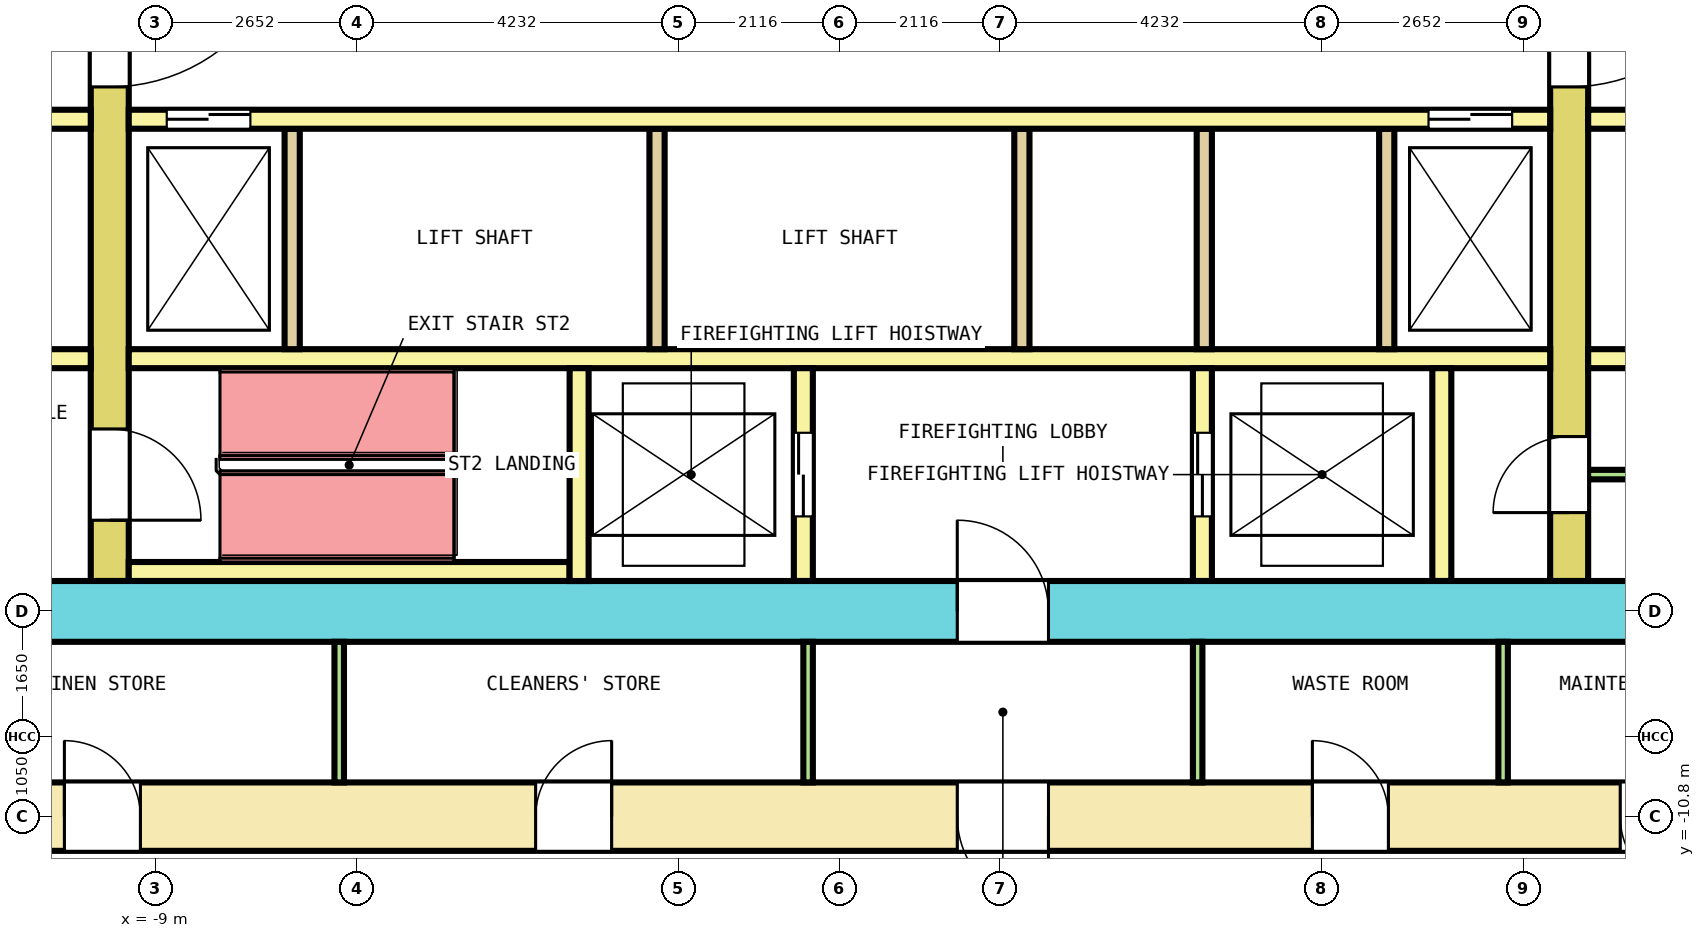
"""IFC4 building model, lengths in metres.
Left out: names, types, materials, properties, quantities, classifications, styles, units other than length and angle.
Written with IfcOpenShell. Run it as: python <this file> out.ifc"""

import sys

from ifc_helpers import new_model, si_unit, direction, frame, frame_2d, origin, place, context, subcontext, project, spatial, rectangle, extrude, element, fill, save


model = new_model("IFC4")
c1 = context("Model", 3, precision=1e-05, world=origin(), true_north=direction((0.0, 1.0)))
c2 = subcontext(c1, "Body", "Model", "MODEL_VIEW")
j1 = project(units=[si_unit("LENGTHUNIT", "METRE"), si_unit("PLANEANGLEUNIT", "RADIAN")], contexts=[c1])
p1 = place(None, origin())
s1 = spatial("IfcSite", under=j1, at=p1, CompositionType="ELEMENT")
p2 = place(p1, origin())
s2 = spatial("IfcBuilding", under=s1, at=p2, CompositionType="ELEMENT")
p3 = place(p2, frame((0.0, 0.0, 36.6)))
s3 = spatial("IfcBuildingStorey", under=s2, at=p3, CompositionType="ELEMENT", Elevation=36.6)
p4 = place(p3, frame((-13.65, -10.8, 0.0), z_axis=(0.0, 0.0, 1.0), x_axis=(1.0, 0.0, 0.0)))
e1 = element("IfcWall", 1, at=p4, inside=s3, PredefinedType="SHEAR", context=c2, shape_type="SweptSolid", body=[
    extrude(rectangle(XDim=27.3, YDim=0.9, at=frame_2d((13.65, 0.0))), origin(), (0.0, 0.0, 1.0), 4.1),
])
p5 = place(p4, frame((3.453, 0.0, 0.0)))
e2 = element("IfcOpeningElement", 2, at=p5, cuts=e1, PredefinedType="OPENING", context=c2, shape_type="SweptSolid", body=[
    extrude(rectangle(XDim=1.0, YDim=2.1, at=frame_2d((0.5, 1.05))), frame((0.0, 0.46, 0.0), z_axis=(0.0, -1.0, 0.0), x_axis=(1.0, 0.0, 0.0)), (0.0, 0.0, 1.0), 0.92),
])
p6 = place(p4, frame((9.653, 0.0, 0.0)))
e3 = element("IfcOpeningElement", 3, at=p6, cuts=e1, PredefinedType="OPENING", context=c2, shape_type="SweptSolid", body=[
    extrude(rectangle(XDim=1.0, YDim=2.1, at=frame_2d((0.5, 1.05))), frame((0.0, 0.46, 0.0), z_axis=(0.0, -1.0, 0.0), x_axis=(1.0, 0.0, 0.0)), (0.0, 0.0, 1.0), 0.92),
])
p7 = place(p4, frame((19.872, 0.0, 0.0)))
e4 = element("IfcOpeningElement", 4, at=p7, cuts=e1, PredefinedType="OPENING", context=c2, shape_type="SweptSolid", body=[
    extrude(rectangle(XDim=1.0, YDim=2.1, at=frame_2d((0.5, 1.05))), frame((0.0, 0.46, 0.0), z_axis=(0.0, -1.0, 0.0), x_axis=(1.0, 0.0, 0.0)), (0.0, 0.0, 1.0), 0.92),
])
p8 = place(p4, frame((23.922, 0.0, 0.0)))
e5 = element("IfcOpeningElement", 5, at=p8, cuts=e1, PredefinedType="OPENING", context=c2, shape_type="SweptSolid", body=[
    extrude(rectangle(XDim=1.0, YDim=2.1, at=frame_2d((0.5, 1.05))), frame((0.0, 0.46, 0.0), z_axis=(0.0, -1.0, 0.0), x_axis=(1.0, 0.0, 0.0)), (0.0, 0.0, 1.0), 0.92),
])
p9 = place(p4, frame((15.2, 0.0, 0.0)))
e6 = element("IfcOpeningElement", 6, at=p9, cuts=e1, PredefinedType="OPENING", context=c2, shape_type="SweptSolid", body=[
    extrude(rectangle(XDim=1.2, YDim=2.1, at=frame_2d((0.6, 1.05))), frame((0.0, 0.46, 0.0), z_axis=(0.0, -1.0, 0.0), x_axis=(1.0, 0.0, 0.0)), (0.0, 0.0, 1.0), 0.92),
])
p10 = place(p3, frame((-12.75, -8.1, 0.0), z_axis=(0.0, 0.0, 1.0), x_axis=(1.0, 0.0, 0.0)))
e7 = element("IfcWall", 7, at=p10, inside=s3, PredefinedType="SHEAR", context=c2, shape_type="SweptSolid", body=[
    extrude(rectangle(XDim=25.5, YDim=0.8, at=frame_2d((12.75, 0.0))), origin(), (0.0, 0.0, 1.0), 4.1),
])
p11 = place(p10, frame((14.3, 0.0, 0.0)))
e8 = element("IfcOpeningElement", 8, at=p11, cuts=e7, PredefinedType="OPENING", context=c2, shape_type="SweptSolid", body=[
    extrude(rectangle(XDim=1.2, YDim=2.1, at=frame_2d((0.6, 1.05))), frame((0.0, 0.41, 0.0), z_axis=(0.0, -1.0, 0.0), x_axis=(1.0, 0.0, 0.0)), (0.0, 0.0, 1.0), 0.82),
])
p12 = place(p3, frame((-9.6, -7.7, 0.0), z_axis=(0.0, 0.0, 1.0), x_axis=(0.0, 1.0, 0.0)))
e9 = element("IfcWall", 9, at=p12, inside=s3, PredefinedType="SHEAR", context=c2, shape_type="SweptSolid", body=[
    extrude(rectangle(XDim=15.4, YDim=0.5, at=frame_2d((7.7, 0.0))), origin(), (0.0, 0.0, 1.0), 4.1),
])
p13 = place(p12, frame((6.5, 0.0, 0.0)))
e10 = element("IfcOpeningElement", 10, at=p13, cuts=e9, PredefinedType="OPENING", context=c2, shape_type="SweptSolid", body=[
    extrude(rectangle(XDim=2.4, YDim=2.1, at=frame_2d((1.2, 1.05))), frame((0.0, 0.26, 0.0), z_axis=(0.0, -1.0, 0.0), x_axis=(1.0, 0.0, 0.0)), (0.0, 0.0, 1.0), 0.52),
])
p14 = place(p12, frame((13.4, 0.0, 0.0)))
e11 = element("IfcOpeningElement", 11, at=p14, cuts=e9, PredefinedType="OPENING", context=c2, shape_type="SweptSolid", body=[
    extrude(rectangle(XDim=1.2, YDim=2.1, at=frame_2d((0.6, 1.05))), frame((0.0, 0.26, 0.0), z_axis=(0.0, -1.0, 0.0), x_axis=(1.0, 0.0, 0.0)), (0.0, 0.0, 1.0), 0.52),
])
p15 = place(p12, frame((0.8, 0.0, 0.0)))
e12 = element("IfcOpeningElement", 12, at=p15, cuts=e9, PredefinedType="OPENING", context=c2, shape_type="SweptSolid", body=[
    extrude(rectangle(XDim=1.2, YDim=2.1, at=frame_2d((0.6, 1.05))), frame((0.0, 0.26, 0.0), z_axis=(0.0, -1.0, 0.0), x_axis=(1.0, 0.0, 0.0)), (0.0, 0.0, 1.0), 0.52),
])
p16 = place(p3, frame((9.6, -7.7, 0.0), z_axis=(0.0, 0.0, 1.0), x_axis=(0.0, 1.0, 0.0)))
e13 = element("IfcWall", 13, at=p16, inside=s3, PredefinedType="SHEAR", context=c2, shape_type="SweptSolid", body=[
    extrude(rectangle(XDim=15.4, YDim=0.5, at=frame_2d((7.7, 0.0))), origin(), (0.0, 0.0, 1.0), 4.1),
])
p17 = place(p16, frame((6.5, 0.0, 0.0)))
e14 = element("IfcOpeningElement", 14, at=p17, cuts=e13, PredefinedType="OPENING", context=c2, shape_type="SweptSolid", body=[
    extrude(rectangle(XDim=2.4, YDim=2.1, at=frame_2d((1.2, 1.05))), frame((0.0, 0.26, 0.0), z_axis=(0.0, -1.0, 0.0), x_axis=(1.0, 0.0, 0.0)), (0.0, 0.0, 1.0), 0.52),
])
p18 = place(p16, frame((13.4, 0.0, 0.0)))
e15 = element("IfcOpeningElement", 15, at=p18, cuts=e13, PredefinedType="OPENING", context=c2, shape_type="SweptSolid", body=[
    extrude(rectangle(XDim=1.2, YDim=2.1, at=frame_2d((0.6, 1.05))), frame((0.0, 0.26, 0.0), z_axis=(0.0, -1.0, 0.0), x_axis=(1.0, 0.0, 0.0)), (0.0, 0.0, 1.0), 0.52),
])
p19 = place(p16, frame((0.9, 0.0, 0.0)))
e16 = element("IfcOpeningElement", 16, at=p19, cuts=e13, PredefinedType="OPENING", context=c2, shape_type="SweptSolid", body=[
    extrude(rectangle(XDim=1.0, YDim=2.1, at=frame_2d((0.5, 1.05))), frame((0.0, 0.26, 0.0), z_axis=(0.0, -1.0, 0.0), x_axis=(1.0, 0.0, 0.0)), (0.0, 0.0, 1.0), 0.52),
])
p20 = place(p3, frame((-12.75, -1.625, 0.0), z_axis=(0.0, 0.0, 1.0), x_axis=(1.0, 0.0, 0.0)))
e17 = element("IfcWall", 17, at=p20, inside=s3, PredefinedType="SOLIDWALL", context=c2, shape_type="SweptSolid", body=[
    extrude(rectangle(XDim=2.9, YDim=0.25, at=frame_2d((1.45, 0.0))), origin(), (0.0, 0.0, 1.0), 4.1),
])
p21 = place(p20, frame((0.9, 0.0, 0.0)))
e18 = element("IfcOpeningElement", 18, at=p21, cuts=e17, PredefinedType="OPENING", context=c2, shape_type="SweptSolid", body=[
    extrude(rectangle(XDim=1.1, YDim=2.1, at=frame_2d((0.55, 1.05))), frame((0.0, 0.135, 0.0), z_axis=(0.0, -1.0, 0.0), x_axis=(1.0, 0.0, 0.0)), (0.0, 0.0, 1.0), 0.27),
])
p22 = place(p3, frame((-9.35, -1.625, 0.0), z_axis=(0.0, 0.0, 1.0), x_axis=(1.0, 0.0, 0.0)))
e19 = element("IfcWall", 19, at=p22, inside=s3, PredefinedType="SOLIDWALL", context=c2, shape_type="SweptSolid", body=[
    extrude(rectangle(XDim=18.7, YDim=0.25, at=frame_2d((9.35, 0.0))), origin(), (0.0, 0.0, 1.0), 4.1),
])
p23 = place(p22, frame((0.5, 0.0, 0.0)))
e20 = element("IfcOpeningElement", 20, at=p23, cuts=e19, PredefinedType="OPENING", context=c2, shape_type="SweptSolid", body=[
    extrude(rectangle(XDim=1.1, YDim=2.1, at=frame_2d((0.55, 1.05))), frame((0.0, 0.135, 0.0), z_axis=(0.0, -1.0, 0.0), x_axis=(1.0, 0.0, 0.0)), (0.0, 0.0, 1.0), 0.27),
])
p24 = place(p22, frame((17.1, 0.0, 0.0)))
e21 = element("IfcOpeningElement", 21, at=p24, cuts=e19, PredefinedType="OPENING", context=c2, shape_type="SweptSolid", body=[
    extrude(rectangle(XDim=1.1, YDim=2.1, at=frame_2d((0.55, 1.05))), frame((0.0, 0.135, 0.0), z_axis=(0.0, -1.0, 0.0), x_axis=(1.0, 0.0, 0.0)), (0.0, 0.0, 1.0), 0.27),
])
p25 = place(p3, frame((9.85, -1.625, 0.0), z_axis=(0.0, 0.0, 1.0), x_axis=(1.0, 0.0, 0.0)))
e22 = element("IfcWall", 22, at=p25, inside=s3, PredefinedType="SOLIDWALL", context=c2, shape_type="SweptSolid", body=[
    extrude(rectangle(XDim=2.9, YDim=0.25, at=frame_2d((1.45, 0.0))), origin(), (0.0, 0.0, 1.0), 4.1),
])
p26 = place(p25, frame((0.9, 0.0, 0.0)))
e23 = element("IfcOpeningElement", 23, at=p26, cuts=e22, PredefinedType="OPENING", context=c2, shape_type="SweptSolid", body=[
    extrude(rectangle(XDim=1.1, YDim=2.1, at=frame_2d((0.55, 1.05))), frame((0.0, 0.135, 0.0), z_axis=(0.0, -1.0, 0.0), x_axis=(1.0, 0.0, 0.0)), (0.0, 0.0, 1.0), 0.27),
])
p27 = place(p3, frame((-12.75, -4.775, 0.0), z_axis=(0.0, 0.0, 1.0), x_axis=(1.0, 0.0, 0.0)))
e24 = element("IfcWall", 24, at=p27, inside=s3, PredefinedType="SOLIDWALL", context=c2, shape_type="SweptSolid", body=[
    extrude(rectangle(XDim=2.9, YDim=0.25, at=frame_2d((1.45, 0.0))), origin(), (0.0, 0.0, 1.0), 4.1),
])
p28 = place(p3, frame((-9.35, -4.775, 0.0), z_axis=(0.0, 0.0, 1.0), x_axis=(1.0, 0.0, 0.0)))
e25 = element("IfcWall", 25, at=p28, inside=s3, PredefinedType="SOLIDWALL", context=c2, shape_type="SweptSolid", body=[
    extrude(rectangle(XDim=18.7, YDim=0.25, at=frame_2d((9.35, 0.0))), origin(), (0.0, 0.0, 1.0), 4.1),
])
p29 = place(p3, frame((9.85, -4.775, 0.0), z_axis=(0.0, 0.0, 1.0), x_axis=(1.0, 0.0, 0.0)))
e26 = element("IfcWall", 26, at=p29, inside=s3, PredefinedType="SOLIDWALL", context=c2, shape_type="SweptSolid", body=[
    extrude(rectangle(XDim=2.9, YDim=0.25, at=frame_2d((1.45, 0.0))), origin(), (0.0, 0.0, 1.0), 4.1),
])
for number, where, z_axis, x_axis in (
    (27, (-7.2, -4.65, 0.0), (0.0, 0.0, 1.0), (0.0, 1.0, 0.0)),
    (28, (-2.4, -4.65, 0.0), (0.0, 0.0, 1.0), (0.0, 1.0, 0.0)),
    (29, (2.4, -4.65, 0.0), (0.0, 0.0, 1.0), (0.0, 1.0, 0.0)),
    (30, (4.8, -4.65, 0.0), (0.0, 0.0, 1.0), (0.0, 1.0, 0.0)),
    (31, (7.2, -4.65, 0.0), (0.0, 0.0, 1.0), (0.0, 1.0, 0.0)),
):
    element("IfcWall", number, at=place(p3, frame(where, z_axis=z_axis, x_axis=x_axis)), inside=s3, PredefinedType="SOLIDWALL", context=c2, shape_type="SweptSolid", body=[
        extrude(rectangle(XDim=2.9, YDim=0.2, at=frame_2d((1.45, 0.0))), origin(), (0.0, 0.0, 1.0), 4.1),
    ])
p30 = place(p3, frame((-9.35, -7.575, 0.0), z_axis=(0.0, 0.0, 1.0), x_axis=(1.0, 0.0, 0.0)))
e32 = element("IfcWall", 32, at=p30, inside=s3, PredefinedType="SOLIDWALL", context=c2, shape_type="SweptSolid", body=[
    extrude(rectangle(XDim=5.8, YDim=0.25, at=frame_2d((2.9, 0.0))), origin(), (0.0, 0.0, 1.0), 4.1),
])
p31 = place(p3, frame((-3.425, -7.7, 0.0), z_axis=(0.0, 0.0, 1.0), x_axis=(0.0, 1.0, 0.0)))
e33 = element("IfcWall", 33, at=p31, inside=s3, PredefinedType="SOLIDWALL", context=c2, shape_type="SweptSolid", body=[
    extrude(rectangle(XDim=2.8, YDim=0.25, at=frame_2d((1.4, 0.0))), origin(), (0.0, 0.0, 1.0), 4.1),
])
p32 = place(p3, frame((-0.475, -7.7, 0.0), z_axis=(0.0, 0.0, 1.0), x_axis=(0.0, 1.0, 0.0)))
e34 = element("IfcWall", 34, at=p32, inside=s3, PredefinedType="SOLIDWALL", context=c2, shape_type="SweptSolid", body=[
    extrude(rectangle(XDim=2.8, YDim=0.25, at=frame_2d((1.4, 0.0))), origin(), (0.0, 0.0, 1.0), 4.1),
])
p33 = place(p32, frame((0.85, 0.0, 0.0)))
e35 = element("IfcOpeningElement", 35, at=p33, cuts=e34, PredefinedType="OPENING", context=c2, shape_type="SweptSolid", body=[
    extrude(rectangle(XDim=1.1, YDim=2.1, at=frame_2d((0.55, 1.05))), frame((0.0, 0.135, 0.0), z_axis=(0.0, -1.0, 0.0), x_axis=(1.0, 0.0, 0.0)), (0.0, 0.0, 1.0), 0.27),
])
p34 = place(p3, frame((4.775, -7.7, 0.0), z_axis=(0.0, 0.0, 1.0), x_axis=(0.0, 1.0, 0.0)))
e36 = element("IfcWall", 36, at=p34, inside=s3, PredefinedType="SOLIDWALL", context=c2, shape_type="SweptSolid", body=[
    extrude(rectangle(XDim=2.8, YDim=0.25, at=frame_2d((1.4, 0.0))), origin(), (0.0, 0.0, 1.0), 4.1),
])
p35 = place(p34, frame((0.85, 0.0, 0.0)))
e37 = element("IfcOpeningElement", 37, at=p35, cuts=e36, PredefinedType="OPENING", context=c2, shape_type="SweptSolid", body=[
    extrude(rectangle(XDim=1.1, YDim=2.1, at=frame_2d((0.55, 1.05))), frame((0.0, 0.135, 0.0), z_axis=(0.0, -1.0, 0.0), x_axis=(1.0, 0.0, 0.0)), (0.0, 0.0, 1.0), 0.27),
])
p36 = place(p3, frame((7.925, -7.7, 0.0), z_axis=(0.0, 0.0, 1.0), x_axis=(0.0, 1.0, 0.0)))
e38 = element("IfcWall", 38, at=p36, inside=s3, PredefinedType="SOLIDWALL", context=c2, shape_type="SweptSolid", body=[
    extrude(rectangle(XDim=2.8, YDim=0.25, at=frame_2d((1.4, 0.0))), origin(), (0.0, 0.0, 1.0), 4.1),
])
p37 = place(p3, frame((9.85, -6.3, 0.0), z_axis=(0.0, 0.0, 1.0), x_axis=(1.0, 0.0, 0.0)))
e39 = element("IfcWall", 39, at=p37, inside=s3, PredefinedType="PARTITIONING", context=c2, shape_type="SweptSolid", body=[
    extrude(rectangle(XDim=2.9, YDim=0.125, at=frame_2d((1.45, 0.0))), origin(), (0.0, 0.0, 1.0), 4.1),
])
for number, where, z_axis, x_axis in (
    (40, (-6.581, -10.35, 0.0), (0.0, 0.0, 1.0), (0.0, 1.0, 0.0)),
    (41, (-0.413, -10.35, 0.0), (0.0, 0.0, 1.0), (0.0, 1.0, 0.0)),
    (42, (4.712, -10.35, 0.0), (0.0, 0.0, 1.0), (0.0, 1.0, 0.0)),
    (43, (8.731, -10.35, 0.0), (0.0, 0.0, 1.0), (0.0, 1.0, 0.0)),
):
    element("IfcWall", number, at=place(p3, frame(where, z_axis=z_axis, x_axis=x_axis)), inside=s3, PredefinedType="PARTITIONING", context=c2, shape_type="SweptSolid", body=[
        extrude(rectangle(XDim=1.85, YDim=0.125, at=frame_2d((0.925, 0.0))), origin(), (0.0, 0.0, 1.0), 4.1),
    ])
p38 = place(p23, origin())
e44 = element("IfcDoor", 44, at=p38, inside=s3, OperationType="DOUBLE_DOOR_SLIDING", PredefinedType="DOOR", context=c2, shape_type="SweptSolid", body=[
    extrude(rectangle(XDim=1.1, YDim=2.1, at=frame_2d((0.55, 1.05))), frame((0.0, 0.075, 0.0), z_axis=(0.0, -1.0, 0.0), x_axis=(1.0, 0.0, 0.0)), (0.0, 0.0, 1.0), 0.15),
])
fill(e20, e44)
p39 = place(p24, origin())
e45 = element("IfcDoor", 45, at=p39, inside=s3, OperationType="DOUBLE_DOOR_SLIDING", PredefinedType="DOOR", context=c2, shape_type="SweptSolid", body=[
    extrude(rectangle(XDim=1.1, YDim=2.1, at=frame_2d((0.55, 1.05))), frame((0.0, 0.075, 0.0), z_axis=(0.0, -1.0, 0.0), x_axis=(1.0, 0.0, 0.0)), (0.0, 0.0, 1.0), 0.15),
])
fill(e21, e45)
p40 = place(p33, origin())
e46 = element("IfcDoor", 46, at=p40, inside=s3, OperationType="DOUBLE_DOOR_SLIDING", PredefinedType="DOOR", context=c2, shape_type="SweptSolid", body=[
    extrude(rectangle(XDim=1.1, YDim=2.1, at=frame_2d((0.55, 1.05))), frame((0.0, 0.075, 0.0), z_axis=(0.0, -1.0, 0.0), x_axis=(1.0, 0.0, 0.0)), (0.0, 0.0, 1.0), 0.15),
])
fill(e35, e46)
p41 = place(p35, origin())
e47 = element("IfcDoor", 47, at=p41, inside=s3, OperationType="DOUBLE_DOOR_SLIDING", PredefinedType="DOOR", context=c2, shape_type="SweptSolid", body=[
    extrude(rectangle(XDim=1.1, YDim=2.1, at=frame_2d((0.55, 1.05))), frame((0.0, 0.075, 0.0), z_axis=(0.0, -1.0, 0.0), x_axis=(1.0, 0.0, 0.0)), (0.0, 0.0, 1.0), 0.15),
])
fill(e37, e47)
p42 = place(p13, origin())
e48 = element("IfcDoor", 48, at=p42, inside=s3, OperationType="DOUBLE_DOOR_SINGLE_SWING", PredefinedType="DOOR", context=c2, shape_type="SweptSolid", body=[
    extrude(rectangle(XDim=2.4, YDim=2.1, at=frame_2d((1.2, 1.05))), frame((0.0, 0.2, 0.0), z_axis=(0.0, -1.0, 0.0), x_axis=(1.0, 0.0, 0.0)), (0.0, 0.0, 1.0), 0.4),
])
fill(e10, e48)
p43 = place(p17, origin())
e49 = element("IfcDoor", 49, at=p43, inside=s3, OperationType="DOUBLE_DOOR_SINGLE_SWING", PredefinedType="DOOR", context=c2, shape_type="SweptSolid", body=[
    extrude(rectangle(XDim=2.4, YDim=2.1, at=frame_2d((1.2, 1.05))), frame((0.0, 0.2, 0.0), z_axis=(0.0, -1.0, 0.0), x_axis=(1.0, 0.0, 0.0)), (0.0, 0.0, 1.0), 0.4),
])
fill(e14, e49)
p44 = place(p15, origin())
e50 = element("IfcDoor", 50, at=p44, inside=s3, OperationType="SINGLE_SWING_RIGHT", PredefinedType="DOOR", context=c2, shape_type="SweptSolid", body=[
    extrude(rectangle(XDim=1.2, YDim=2.1, at=frame_2d((0.6, 1.05))), frame((0.0, 0.2, 0.0), z_axis=(0.0, -1.0, 0.0), x_axis=(1.0, 0.0, 0.0)), (0.0, 0.0, 1.0), 0.4),
])
fill(e12, e50)
p45 = place(p11, origin())
e51 = element("IfcDoor", 51, at=p45, inside=s3, OperationType="SINGLE_SWING_RIGHT", PredefinedType="DOOR", context=c2, shape_type="SweptSolid", body=[
    extrude(rectangle(XDim=1.2, YDim=2.1, at=frame_2d((0.6, 1.05))), frame((0.0, 0.3, 0.0), z_axis=(0.0, -1.0, 0.0), x_axis=(1.0, 0.0, 0.0)), (0.0, 0.0, 1.0), 0.6),
])
fill(e8, e51)
p46 = place(p19, origin())
e52 = element("IfcDoor", 52, at=p46, inside=s3, OperationType="SINGLE_SWING_RIGHT", PredefinedType="DOOR", context=c2, shape_type="SweptSolid", body=[
    extrude(rectangle(XDim=1.0, YDim=2.1, at=frame_2d((0.5, 1.05))), frame((0.0, 0.2, 0.0), z_axis=(0.0, -1.0, 0.0), x_axis=(1.0, 0.0, 0.0)), (0.0, 0.0, 1.0), 0.4),
])
fill(e16, e52)
p47 = place(p5, origin())
e53 = element("IfcDoor", 53, at=p47, inside=s3, OperationType="SINGLE_SWING_LEFT", PredefinedType="DOOR", context=c2, shape_type="SweptSolid", body=[
    extrude(rectangle(XDim=1.0, YDim=2.1, at=frame_2d((0.5, 1.05))), frame((0.0, 0.3, 0.0), z_axis=(0.0, -1.0, 0.0), x_axis=(1.0, 0.0, 0.0)), (0.0, 0.0, 1.0), 0.6),
])
fill(e2, e53)
p48 = place(p6, origin())
e54 = element("IfcDoor", 54, at=p48, inside=s3, OperationType="SINGLE_SWING_RIGHT", PredefinedType="DOOR", context=c2, shape_type="SweptSolid", body=[
    extrude(rectangle(XDim=1.0, YDim=2.1, at=frame_2d((0.5, 1.05))), frame((0.0, 0.3, 0.0), z_axis=(0.0, -1.0, 0.0), x_axis=(1.0, 0.0, 0.0)), (0.0, 0.0, 1.0), 0.6),
])
fill(e3, e54)
p49 = place(p7, origin())
e55 = element("IfcDoor", 55, at=p49, inside=s3, OperationType="SINGLE_SWING_LEFT", PredefinedType="DOOR", context=c2, shape_type="SweptSolid", body=[
    extrude(rectangle(XDim=1.0, YDim=2.1, at=frame_2d((0.5, 1.05))), frame((0.0, 0.3, 0.0), z_axis=(0.0, -1.0, 0.0), x_axis=(1.0, 0.0, 0.0)), (0.0, 0.0, 1.0), 0.6),
])
fill(e4, e55)
p50 = place(p8, origin())
e56 = element("IfcDoor", 56, at=p50, inside=s3, OperationType="SINGLE_SWING_RIGHT", PredefinedType="DOOR", context=c2, shape_type="SweptSolid", body=[
    extrude(rectangle(XDim=1.0, YDim=2.1, at=frame_2d((0.5, 1.05))), frame((0.0, 0.3, 0.0), z_axis=(0.0, -1.0, 0.0), x_axis=(1.0, 0.0, 0.0)), (0.0, 0.0, 1.0), 0.6),
])
fill(e5, e56)
p51 = place(p9, origin())
e57 = element("IfcDoor", 57, at=p51, inside=s3, OperationType="SINGLE_SWING_LEFT", PredefinedType="DOOR", context=c2, shape_type="SweptSolid", body=[
    extrude(rectangle(XDim=1.2, YDim=2.1, at=frame_2d((0.6, 1.05))), frame((0.0, 0.3, 0.0), z_axis=(0.0, -1.0, 0.0), x_axis=(1.0, 0.0, 0.0)), (0.0, 0.0, 1.0), 0.6),
])
fill(e6, e57)
save(model, sys.argv[1])
